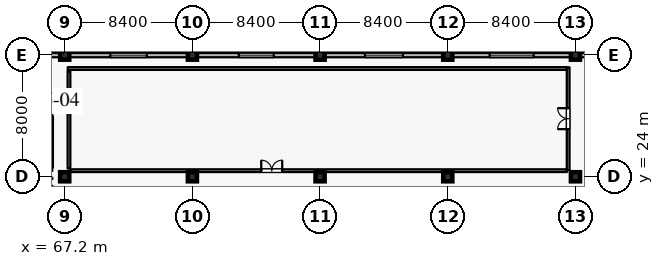
"""IFC4 building model, lengths in metres.
Left out: names, types, materials, properties, quantities, classifications, styles, units other than length and angle.
Written with IfcOpenShell. Run it as: python <this file> out.ifc"""

import sys

from ifc_helpers import new_model, si_unit, direction, frame, frame_2d, origin, origin_2d, place, context, subcontext, project, spatial, rectangle, extrude, element, fill, save


model = new_model("IFC4")
c1 = context("Model", 3, precision=1e-05, world=origin(), true_north=direction((0.0, 1.0)))
c2 = subcontext(c1, "Body", "Model", "MODEL_VIEW")
j1 = project(units=[si_unit("LENGTHUNIT", "METRE"), si_unit("PLANEANGLEUNIT", "RADIAN")], contexts=[c1])
p1 = place(None, origin())
s1 = spatial("IfcSite", under=j1, at=p1, CompositionType="ELEMENT")
p2 = place(p1, origin())
s2 = spatial("IfcBuilding", under=s1, at=p2, CompositionType="ELEMENT")
p3 = place(p2, frame((0.0, 0.0, 16.2)))
s3 = spatial("IfcBuildingStorey", under=s2, at=p3, CompositionType="ELEMENT", Elevation=16.2)
for number, where, z_axis, x_axis in (
    (1, (67.2, 24.0, 0.0), (0.0, 0.0, 1.0), (1.0, 0.0, 0.0)),
    (2, (67.2, 32.0, 0.0), (0.0, 0.0, 1.0), (1.0, 0.0, 0.0)),
    (3, (75.6, 24.0, 0.0), (0.0, 0.0, 1.0), (1.0, 0.0, 0.0)),
    (4, (75.6, 32.0, 0.0), (0.0, 0.0, 1.0), (1.0, 0.0, 0.0)),
    (5, (84.0, 24.0, 0.0), (0.0, 0.0, 1.0), (1.0, 0.0, 0.0)),
    (6, (84.0, 32.0, 0.0), (0.0, 0.0, 1.0), (1.0, 0.0, 0.0)),
    (7, (92.4, 24.0, 0.0), (0.0, 0.0, 1.0), (1.0, 0.0, 0.0)),
    (8, (92.4, 32.0, 0.0), (0.0, 0.0, 1.0), (1.0, 0.0, 0.0)),
    (9, (100.8, 24.0, 0.0), (0.0, 0.0, 1.0), (1.0, 0.0, 0.0)),
    (10, (100.8, 32.0, 0.0), (0.0, 0.0, 1.0), (1.0, 0.0, 0.0)),
):
    element("IfcColumn", number, at=place(p3, frame(where, z_axis=z_axis, x_axis=x_axis)), inside=s3, PredefinedType="COLUMN", context=c2, shape_type="SweptSolid", body=[
        extrude(rectangle(XDim=0.6, YDim=0.6, at=origin_2d()), origin(), (0.0, 0.0, 1.0), 4.8),
    ])
p4 = place(p3, frame((59.58, 32.0, 0.0), z_axis=(0.0, 0.0, 1.0), x_axis=(1.0, 0.0, 0.0)))
e11 = element("IfcWall", 11, at=p4, inside=s3, PredefinedType="SOLIDWALL", context=c2, shape_type="SweptSolid", body=[
    extrude(rectangle(XDim=7.32, YDim=0.28, at=frame_2d((3.66, 0.0))), origin(), (0.0, 0.0, 1.0), 4.5),
])
p5 = place(p4, frame((2.76, 0.0, 0.0)))
e12 = element("IfcOpeningElement", 12, at=p5, cuts=e11, PredefinedType="OPENING", context=c2, shape_type="SweptSolid", body=[
    extrude(rectangle(XDim=1.8, YDim=2.3, at=frame_2d((0.9, 1.15))), frame((0.0, 0.15, 0.0), z_axis=(0.0, -1.0, 0.0), x_axis=(1.0, 0.0, 0.0)), (0.0, 0.0, 1.0), 0.3),
])
p6 = place(p3, frame((67.5, 32.0, 0.0), z_axis=(0.0, 0.0, 1.0), x_axis=(1.0, 0.0, 0.0)))
e13 = element("IfcWall", 13, at=p6, inside=s3, PredefinedType="SOLIDWALL", context=c2, shape_type="SweptSolid", body=[
    extrude(rectangle(XDim=7.8, YDim=0.28, at=frame_2d((3.9, 0.0))), origin(), (0.0, 0.0, 1.0), 3.69),
])
p7 = place(p6, frame((2.7, 0.0, 0.95)))
e14 = element("IfcOpeningElement", 14, at=p7, cuts=e13, PredefinedType="OPENING", context=c2, shape_type="SweptSolid", body=[
    extrude(rectangle(XDim=2.4, YDim=1.2, at=frame_2d((1.2, 0.6))), frame((0.0, 0.15, 0.0), z_axis=(0.0, -1.0, 0.0), x_axis=(1.0, 0.0, 0.0)), (0.0, 0.0, 1.0), 0.3),
])
p8 = place(p3, frame((75.9, 32.0, 0.0), z_axis=(0.0, 0.0, 1.0), x_axis=(1.0, 0.0, 0.0)))
e15 = element("IfcWall", 15, at=p8, inside=s3, PredefinedType="SOLIDWALL", context=c2, shape_type="SweptSolid", body=[
    extrude(rectangle(XDim=7.8, YDim=0.28, at=frame_2d((3.9, 0.0))), origin(), (0.0, 0.0, 1.0), 3.69),
])
p9 = place(p8, frame((2.75, 0.0, 0.95)))
e16 = element("IfcOpeningElement", 16, at=p9, cuts=e15, PredefinedType="OPENING", context=c2, shape_type="SweptSolid", body=[
    extrude(rectangle(XDim=2.3, YDim=1.5, at=frame_2d((1.15, 0.75))), frame((0.0, 0.15, 0.0), z_axis=(0.0, -1.0, 0.0), x_axis=(1.0, 0.0, 0.0)), (0.0, 0.0, 1.0), 0.3),
])
p10 = place(p3, frame((84.3, 32.0, 0.0), z_axis=(0.0, 0.0, 1.0), x_axis=(1.0, 0.0, 0.0)))
e17 = element("IfcWall", 17, at=p10, inside=s3, PredefinedType="SOLIDWALL", context=c2, shape_type="SweptSolid", body=[
    extrude(rectangle(XDim=7.8, YDim=0.28, at=frame_2d((3.9, 0.0))), origin(), (0.0, 0.0, 1.0), 3.69),
])
p11 = place(p10, frame((2.65, 0.0, 0.95)))
e18 = element("IfcOpeningElement", 18, at=p11, cuts=e17, PredefinedType="OPENING", context=c2, shape_type="SweptSolid", body=[
    extrude(rectangle(XDim=2.5, YDim=1.65, at=frame_2d((1.25, 0.825))), frame((0.0, 0.15, 0.0), z_axis=(0.0, -1.0, 0.0), x_axis=(1.0, 0.0, 0.0)), (0.0, 0.0, 1.0), 0.3),
])
p12 = place(p3, frame((92.7, 32.0, 0.0), z_axis=(0.0, 0.0, 1.0), x_axis=(1.0, 0.0, 0.0)))
e19 = element("IfcWall", 19, at=p12, inside=s3, PredefinedType="SOLIDWALL", context=c2, shape_type="SweptSolid", body=[
    extrude(rectangle(XDim=7.8, YDim=0.28, at=frame_2d((3.9, 0.0))), origin(), (0.0, 0.0, 1.0), 3.69),
])
p13 = place(p12, frame((2.45, 0.0, 0.95)))
e20 = element("IfcOpeningElement", 20, at=p13, cuts=e19, PredefinedType="OPENING", context=c2, shape_type="SweptSolid", body=[
    extrude(rectangle(XDim=2.9, YDim=1.75, at=frame_2d((1.45, 0.875))), frame((0.0, 0.15, 0.0), z_axis=(0.0, -1.0, 0.0), x_axis=(1.0, 0.0, 0.0)), (0.0, 0.0, 1.0), 0.3),
])
p14 = place(p3, frame((101.1, 32.0, 0.0), z_axis=(0.0, 0.0, 1.0), x_axis=(1.0, 0.0, 0.0)))
e21 = element("IfcWall", 21, at=p14, inside=s3, PredefinedType="SOLIDWALL", context=c2, shape_type="SweptSolid", body=[
    extrude(rectangle(XDim=7.8, YDim=0.28, at=frame_2d((3.9, 0.0))), origin(), (0.0, 0.0, 1.0), 3.69),
])
p15 = place(p14, frame((2.2, 0.0, 0.95)))
e22 = element("IfcOpeningElement", 22, at=p15, cuts=e21, PredefinedType="OPENING", context=c2, shape_type="SweptSolid", body=[
    extrude(rectangle(XDim=3.4, YDim=1.85, at=frame_2d((1.7, 0.925))), frame((0.0, 0.15, 0.0), z_axis=(0.0, -1.0, 0.0), x_axis=(1.0, 0.0, 0.0)), (0.0, 0.0, 1.0), 0.3),
])
p16 = place(p3, frame((67.56, 24.4, 0.0), z_axis=(0.0, 0.0, 1.0), x_axis=(1.0, 0.0, 0.0)))
e23 = element("IfcWall", 23, at=p16, inside=s3, PredefinedType="PARTITIONING", context=c2, shape_type="SweptSolid", body=[
    extrude(rectangle(XDim=32.68, YDim=0.18, at=frame_2d((16.34, 0.0))), origin(), (0.0, 0.0, 1.0), 4.535),
])
p17 = place(p16, frame((12.568, 0.0, 0.0)))
e24 = element("IfcOpeningElement", 24, at=p17, cuts=e23, PredefinedType="OPENING", context=c2, shape_type="SweptSolid", body=[
    extrude(rectangle(XDim=1.38, YDim=2.3, at=frame_2d((0.69, 1.15))), frame((0.0, 0.1, 0.0), z_axis=(0.0, -1.0, 0.0), x_axis=(1.0, 0.0, 0.0)), (0.0, 0.0, 1.0), 0.2),
])
p18 = place(p3, frame((67.48, 24.54, 0.0), z_axis=(0.0, 0.0, 1.0), x_axis=(0.0, 1.0, 0.0)))
e25 = element("IfcWall", 25, at=p18, inside=s3, PredefinedType="PARTITIONING", context=c2, shape_type="SweptSolid", body=[
    extrude(rectangle(XDim=6.41, YDim=0.18, at=frame_2d((3.205, 0.0))), origin(), (0.0, 0.0, 1.0), 4.535),
])
p19 = place(p3, frame((100.32, 24.432, 0.0), z_axis=(0.0, 0.0, 1.0), x_axis=(0.0, 1.0, 0.0)))
e26 = element("IfcWall", 26, at=p19, inside=s3, PredefinedType="PARTITIONING", context=c2, shape_type="SweptSolid", body=[
    extrude(rectangle(XDim=6.768, YDim=0.18, at=frame_2d((3.384, 0.0))), origin(), (0.0, 0.0, 1.0), 4.535),
])
p20 = place(p19, frame((2.7, 0.0, 0.0)))
e27 = element("IfcOpeningElement", 27, at=p20, cuts=e26, PredefinedType="OPENING", context=c2, shape_type="SweptSolid", body=[
    extrude(rectangle(XDim=1.38, YDim=2.3, at=frame_2d((0.69, 1.15))), frame((0.0, 0.1, 0.0), z_axis=(0.0, -1.0, 0.0), x_axis=(1.0, 0.0, 0.0)), (0.0, 0.0, 1.0), 0.2),
])
p21 = place(p3, frame((67.4, 31.12, 0.0), z_axis=(0.0, 0.0, 1.0), x_axis=(1.0, 0.0, 0.0)))
e28 = element("IfcWall", 28, at=p21, inside=s3, PredefinedType="PARTITIONING", context=c2, shape_type="SweptSolid", body=[
    extrude(rectangle(XDim=32.83, YDim=0.18, at=frame_2d((16.415, 0.0))), origin(), (0.0, 0.0, 1.0), 4.535),
])
p22 = place(p7, origin())
e29 = element("IfcWindow", 29, at=p22, inside=s3, PartitioningType="DOUBLE_PANEL_VERTICAL", PredefinedType="WINDOW", context=c2, shape_type="SweptSolid", body=[
    extrude(rectangle(XDim=2.4, YDim=1.2, at=frame_2d((1.2, 0.6))), frame((0.0, 0.03, 0.0), z_axis=(0.0, -1.0, 0.0), x_axis=(1.0, 0.0, 0.0)), (0.0, 0.0, 1.0), 0.06),
])
fill(e14, e29)
p23 = place(p9, origin())
e30 = element("IfcWindow", 30, at=p23, inside=s3, PartitioningType="DOUBLE_PANEL_VERTICAL", PredefinedType="WINDOW", context=c2, shape_type="SweptSolid", body=[
    extrude(rectangle(XDim=2.3, YDim=1.5, at=frame_2d((1.15, 0.75))), frame((0.0, 0.03, 0.0), z_axis=(0.0, -1.0, 0.0), x_axis=(1.0, 0.0, 0.0)), (0.0, 0.0, 1.0), 0.06),
])
fill(e16, e30)
p24 = place(p11, origin())
e31 = element("IfcWindow", 31, at=p24, inside=s3, PartitioningType="DOUBLE_PANEL_VERTICAL", PredefinedType="WINDOW", context=c2, shape_type="SweptSolid", body=[
    extrude(rectangle(XDim=2.5, YDim=1.65, at=frame_2d((1.25, 0.825))), frame((0.0, 0.03, 0.0), z_axis=(0.0, -1.0, 0.0), x_axis=(1.0, 0.0, 0.0)), (0.0, 0.0, 1.0), 0.06),
])
fill(e18, e31)
p25 = place(p13, origin())
e32 = element("IfcWindow", 32, at=p25, inside=s3, PartitioningType="DOUBLE_PANEL_VERTICAL", PredefinedType="WINDOW", context=c2, shape_type="SweptSolid", body=[
    extrude(rectangle(XDim=2.9, YDim=1.75, at=frame_2d((1.45, 0.875))), frame((0.0, 0.03, 0.0), z_axis=(0.0, -1.0, 0.0), x_axis=(1.0, 0.0, 0.0)), (0.0, 0.0, 1.0), 0.06),
])
fill(e20, e32)
p26 = place(p17, origin())
e33 = element("IfcDoor", 33, at=p26, inside=s3, OperationType="DOUBLE_DOOR_SINGLE_SWING", PredefinedType="DOOR", context=c2, shape_type="SweptSolid", body=[
    extrude(rectangle(XDim=1.38, YDim=2.3, at=frame_2d((0.69, 1.15))), frame((0.0, 0.025, 0.0), z_axis=(0.0, -1.0, 0.0), x_axis=(1.0, 0.0, 0.0)), (0.0, 0.0, 1.0), 0.05),
])
fill(e24, e33)
p27 = place(p20, origin())
e34 = element("IfcDoor", 34, at=p27, inside=s3, OperationType="DOUBLE_DOOR_SINGLE_SWING", PredefinedType="DOOR", context=c2, shape_type="SweptSolid", body=[
    extrude(rectangle(XDim=1.38, YDim=2.3, at=frame_2d((0.69, 1.15))), frame((0.0, 0.025, 0.0), z_axis=(0.0, -1.0, 0.0), x_axis=(1.0, 0.0, 0.0)), (0.0, 0.0, 1.0), 0.05),
])
fill(e27, e34)
save(model, sys.argv[1])
